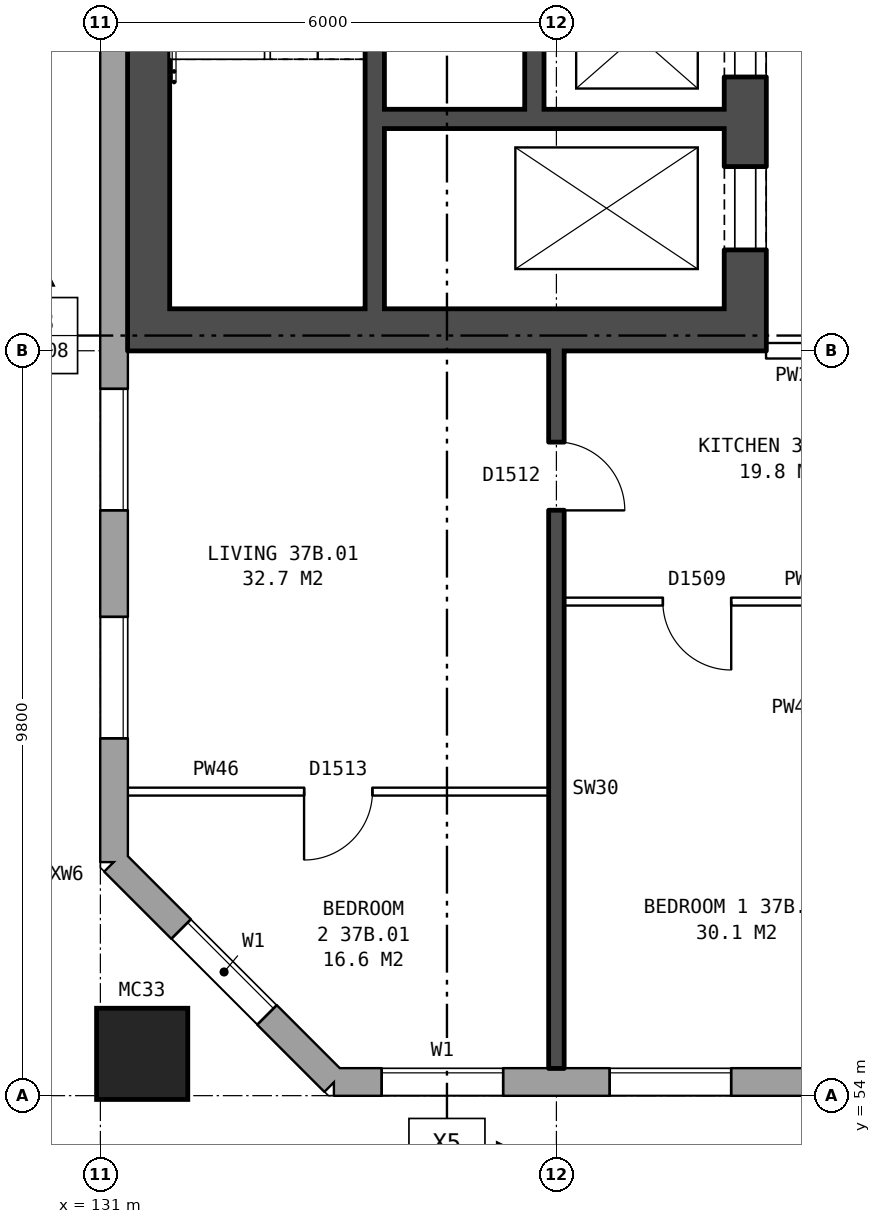
"""IFC4 building model, lengths in metres.
Left out: names, types, materials, properties, quantities, classifications, styles, units other than length and angle.
Written with IfcOpenShell. Run it as: python <this file> out.ifc"""

import sys

from ifc_helpers import new_model, si_unit, direction, frame, frame_2d, origin, origin_2d, place, context, subcontext, project, spatial, rectangle, hollow_rectangle, extrude, element, fill, save


model = new_model("IFC4")
c1 = context("Model", 3, precision=1e-05, world=origin(), true_north=direction((0.0, 1.0)))
c2 = subcontext(c1, "Body", "Model", "MODEL_VIEW")
j1 = project(units=[si_unit("LENGTHUNIT", "METRE"), si_unit("PLANEANGLEUNIT", "RADIAN")], contexts=[c1])
p1 = place(None, origin())
s1 = spatial("IfcSite", under=j1, at=p1, CompositionType="ELEMENT")
p2 = place(p1, origin())
s2 = spatial("IfcBuilding", under=s1, at=p2, CompositionType="ELEMENT")
p3 = place(p2, frame((0.0, 0.0, 133.0)))
s3 = spatial("IfcBuildingStorey", under=s2, at=p3, CompositionType="ELEMENT", Elevation=133.0)
p4 = place(p3, frame((131.55, 54.55, 0.0), z_axis=(0.0, 0.0, 1.0), x_axis=(1.0, 0.0, 0.0)))
e1 = element("IfcColumn", 1, at=p4, inside=s3, PredefinedType="COLUMN", context=c2, shape_type="SweptSolid", body=[
    extrude(hollow_rectangle(XDim=1.2, YDim=1.2, WallThickness=0.065, at=origin_2d()), origin(), (0.0, 0.0, 1.0), 3.1),
])
p5 = place(p3, frame((131.18, 57.075, 0.0), z_axis=(0.0, 0.0, 1.0), x_axis=(0.707106781187, -0.707106781187, 0.0)))
e2 = element("IfcWall", 2, at=p5, inside=s3, PredefinedType="STANDARD", context=c2, shape_type="SweptSolid", body=[
    extrude(rectangle(XDim=4.094, YDim=0.36, at=frame_2d((2.047, 0.0))), origin(), (0.0, 0.0, 1.0), 2.85),
])
p6 = place(p5, frame((1.247, 0.0, 0.8)))
e3 = element("IfcOpeningElement", 3, at=p6, cuts=e2, PredefinedType="OPENING", context=c2, shape_type="SweptSolid", body=[
    extrude(rectangle(XDim=1.6, YDim=1.8, at=frame_2d((0.8, 0.9))), frame((0.0, 0.19, 0.0), z_axis=(0.0, -1.0, 0.0), x_axis=(1.0, 0.0, 0.0)), (0.0, 0.0, 1.0), 0.38),
])
p7 = place(p3, frame((134.075, 54.18, 0.0), z_axis=(0.0, 0.0, 1.0), x_axis=(1.0, 0.0, 0.0)))
e4 = element("IfcWall", 4, at=p7, inside=s3, PredefinedType="STANDARD", context=c2, shape_type="SweptSolid", body=[
    extrude(rectangle(XDim=35.601, YDim=0.36, at=frame_2d((17.8, 0.0))), origin(), (0.0, 0.0, 1.0), 2.85),
])
p8 = place(p7, frame((0.625, 0.0, 0.8)))
e5 = element("IfcOpeningElement", 5, at=p8, cuts=e4, PredefinedType="OPENING", context=c2, shape_type="SweptSolid", body=[
    extrude(rectangle(XDim=1.6, YDim=1.8, at=frame_2d((0.8, 0.9))), frame((0.0, 0.19, 0.0), z_axis=(0.0, -1.0, 0.0), x_axis=(1.0, 0.0, 0.0)), (0.0, 0.0, 1.0), 0.38),
])
p9 = place(p7, frame((3.625, 0.0, 0.8)))
e6 = element("IfcOpeningElement", 6, at=p9, cuts=e4, PredefinedType="OPENING", context=c2, shape_type="SweptSolid", body=[
    extrude(rectangle(XDim=1.6, YDim=1.8, at=frame_2d((0.8, 0.9))), frame((0.0, 0.19, 0.0), z_axis=(0.0, -1.0, 0.0), x_axis=(1.0, 0.0, 0.0)), (0.0, 0.0, 1.0), 0.38),
])
p10 = place(p7, frame((6.625, 0.0, 0.8)))
e7 = element("IfcOpeningElement", 7, at=p10, cuts=e4, PredefinedType="OPENING", context=c2, shape_type="SweptSolid", body=[
    extrude(rectangle(XDim=1.6, YDim=1.8, at=frame_2d((0.8, 0.9))), frame((0.0, 0.19, 0.0), z_axis=(0.0, -1.0, 0.0), x_axis=(1.0, 0.0, 0.0)), (0.0, 0.0, 1.0), 0.38),
])
p11 = place(p7, frame((9.125, 0.0, 1.35)))
e8 = element("IfcOpeningElement", 8, at=p11, cuts=e4, PredefinedType="OPENING", context=c2, shape_type="SweptSolid", body=[
    extrude(rectangle(XDim=1.2, YDim=1.2, at=frame_2d((0.6, 0.6))), frame((0.0, 0.19, 0.0), z_axis=(0.0, -1.0, 0.0), x_axis=(1.0, 0.0, 0.0)), (0.0, 0.0, 1.0), 0.38),
])
p12 = place(p7, frame((12.625, 0.0, 0.8)))
e9 = element("IfcOpeningElement", 9, at=p12, cuts=e4, PredefinedType="OPENING", context=c2, shape_type="SweptSolid", body=[
    extrude(rectangle(XDim=1.6, YDim=1.8, at=frame_2d((0.8, 0.9))), frame((0.0, 0.19, 0.0), z_axis=(0.0, -1.0, 0.0), x_axis=(1.0, 0.0, 0.0)), (0.0, 0.0, 1.0), 0.38),
])
p13 = place(p7, frame((15.625, 0.0, 0.8)))
e10 = element("IfcOpeningElement", 10, at=p13, cuts=e4, PredefinedType="OPENING", context=c2, shape_type="SweptSolid", body=[
    extrude(rectangle(XDim=1.6, YDim=1.8, at=frame_2d((0.8, 0.9))), frame((0.0, 0.19, 0.0), z_axis=(0.0, -1.0, 0.0), x_axis=(1.0, 0.0, 0.0)), (0.0, 0.0, 1.0), 0.38),
])
p14 = place(p7, frame((18.625, 0.0, 0.8)))
e11 = element("IfcOpeningElement", 11, at=p14, cuts=e4, PredefinedType="OPENING", context=c2, shape_type="SweptSolid", body=[
    extrude(rectangle(XDim=1.6, YDim=1.8, at=frame_2d((0.8, 0.9))), frame((0.0, 0.19, 0.0), z_axis=(0.0, -1.0, 0.0), x_axis=(1.0, 0.0, 0.0)), (0.0, 0.0, 1.0), 0.38),
])
p15 = place(p7, frame((21.625, 0.0, 0.8)))
e12 = element("IfcOpeningElement", 12, at=p15, cuts=e4, PredefinedType="OPENING", context=c2, shape_type="SweptSolid", body=[
    extrude(rectangle(XDim=1.6, YDim=1.8, at=frame_2d((0.8, 0.9))), frame((0.0, 0.19, 0.0), z_axis=(0.0, -1.0, 0.0), x_axis=(1.0, 0.0, 0.0)), (0.0, 0.0, 1.0), 0.38),
])
p16 = place(p7, frame((24.975, 0.0, 1.7)))
e13 = element("IfcOpeningElement", 13, at=p16, cuts=e4, PredefinedType="OPENING", context=c2, shape_type="SweptSolid", body=[
    extrude(rectangle(XDim=0.6, YDim=0.9, at=frame_2d((0.3, 0.45))), frame((0.0, 0.19, 0.0), z_axis=(0.0, -1.0, 0.0), x_axis=(1.0, 0.0, 0.0)), (0.0, 0.0, 1.0), 0.38),
])
p17 = place(p7, frame((27.625, 0.0, 0.8)))
e14 = element("IfcOpeningElement", 14, at=p17, cuts=e4, PredefinedType="OPENING", context=c2, shape_type="SweptSolid", body=[
    extrude(rectangle(XDim=1.6, YDim=1.8, at=frame_2d((0.8, 0.9))), frame((0.0, 0.19, 0.0), z_axis=(0.0, -1.0, 0.0), x_axis=(1.0, 0.0, 0.0)), (0.0, 0.0, 1.0), 0.38),
])
p18 = place(p7, frame((30.625, 0.0, 0.8)))
e15 = element("IfcOpeningElement", 15, at=p18, cuts=e4, PredefinedType="OPENING", context=c2, shape_type="SweptSolid", body=[
    extrude(rectangle(XDim=1.6, YDim=1.8, at=frame_2d((0.8, 0.9))), frame((0.0, 0.19, 0.0), z_axis=(0.0, -1.0, 0.0), x_axis=(1.0, 0.0, 0.0)), (0.0, 0.0, 1.0), 0.38),
])
p19 = place(p7, frame((33.625, 0.0, 0.8)))
e16 = element("IfcOpeningElement", 16, at=p19, cuts=e4, PredefinedType="OPENING", context=c2, shape_type="SweptSolid", body=[
    extrude(rectangle(XDim=1.6, YDim=1.8, at=frame_2d((0.8, 0.9))), frame((0.0, 0.19, 0.0), z_axis=(0.0, -1.0, 0.0), x_axis=(1.0, 0.0, 0.0)), (0.0, 0.0, 1.0), 0.38),
])
p20 = place(p7, frame((11.125, 0.0, 0.15)))
e17 = element("IfcOpeningElement", 17, at=p20, cuts=e4, PredefinedType="OPENING", context=c2, shape_type="SweptSolid", body=[
    extrude(rectangle(XDim=0.6, YDim=0.9, at=frame_2d((0.3, 0.45))), frame((0.0, 0.19, 0.0), z_axis=(0.0, -1.0, 0.0), x_axis=(1.0, 0.0, 0.0)), (0.0, 0.0, 1.0), 0.38),
])
p21 = place(p7, frame((25.875, 0.0, 0.8)))
e18 = element("IfcOpeningElement", 18, at=p21, cuts=e4, PredefinedType="OPENING", context=c2, shape_type="SweptSolid", body=[
    extrude(rectangle(XDim=0.8, YDim=1.8, at=frame_2d((0.4, 0.9))), frame((0.0, 0.19, 0.0), z_axis=(0.0, -1.0, 0.0), x_axis=(1.0, 0.0, 0.0)), (0.0, 0.0, 1.0), 0.38),
])
p22 = place(p3, frame((131.18, 82.925, 0.0), z_axis=(0.0, 0.0, 1.0), x_axis=(0.0, -1.0, 0.0)))
e19 = element("IfcWall", 19, at=p22, inside=s3, PredefinedType="STANDARD", context=c2, shape_type="SweptSolid", body=[
    extrude(rectangle(XDim=25.851, YDim=0.36, at=frame_2d((12.925, 0.0))), origin(), (0.0, 0.0, 1.0), 2.85),
])
p23 = place(p22, frame((1.625, 0.0, 0.8)))
e20 = element("IfcOpeningElement", 20, at=p23, cuts=e19, PredefinedType="OPENING", context=c2, shape_type="SweptSolid", body=[
    extrude(rectangle(XDim=1.6, YDim=1.8, at=frame_2d((0.8, 0.9))), frame((0.0, 0.19, 0.0), z_axis=(0.0, -1.0, 0.0), x_axis=(1.0, 0.0, 0.0)), (0.0, 0.0, 1.0), 0.38),
])
p24 = place(p22, frame((4.625, 0.0, 0.8)))
e21 = element("IfcOpeningElement", 21, at=p24, cuts=e19, PredefinedType="OPENING", context=c2, shape_type="SweptSolid", body=[
    extrude(rectangle(XDim=1.6, YDim=1.8, at=frame_2d((0.8, 0.9))), frame((0.0, 0.19, 0.0), z_axis=(0.0, -1.0, 0.0), x_axis=(1.0, 0.0, 0.0)), (0.0, 0.0, 1.0), 0.38),
])
p25 = place(p22, frame((19.625, 0.0, 0.8)))
e22 = element("IfcOpeningElement", 22, at=p25, cuts=e19, PredefinedType="OPENING", context=c2, shape_type="SweptSolid", body=[
    extrude(rectangle(XDim=1.6, YDim=1.8, at=frame_2d((0.8, 0.9))), frame((0.0, 0.19, 0.0), z_axis=(0.0, -1.0, 0.0), x_axis=(1.0, 0.0, 0.0)), (0.0, 0.0, 1.0), 0.38),
])
p26 = place(p22, frame((22.625, 0.0, 0.8)))
e23 = element("IfcOpeningElement", 23, at=p26, cuts=e19, PredefinedType="OPENING", context=c2, shape_type="SweptSolid", body=[
    extrude(rectangle(XDim=1.6, YDim=1.8, at=frame_2d((0.8, 0.9))), frame((0.0, 0.19, 0.0), z_axis=(0.0, -1.0, 0.0), x_axis=(1.0, 0.0, 0.0)), (0.0, 0.0, 1.0), 0.38),
])
p27 = place(p3, frame((139.485, 63.8, 0.0), z_axis=(0.0, 0.0, 1.0), x_axis=(0.0, 1.0, 0.0)))
e24 = element("IfcWall", 24, at=p27, inside=s3, PredefinedType="SHEAR", context=c2, shape_type="SweptSolid", body=[
    extrude(rectangle(XDim=12.4, YDim=0.55, at=frame_2d((6.2, 0.0))), origin(), (0.0, 0.0, 1.0), 2.85),
])
p28 = place(p27, frame((1.325, 0.0, 0.0)))
e25 = element("IfcOpeningElement", 25, at=p28, cuts=e24, PredefinedType="OPENING", context=c2, shape_type="SweptSolid", body=[
    extrude(rectangle(XDim=1.1, YDim=2.1, at=frame_2d((0.55, 1.05))), frame((0.0, 0.285, 0.0), z_axis=(0.0, -1.0, 0.0), x_axis=(1.0, 0.0, 0.0)), (0.0, 0.0, 1.0), 0.57),
])
p29 = place(p27, frame((3.6, 0.0, 0.0)))
e26 = element("IfcOpeningElement", 26, at=p29, cuts=e24, PredefinedType="OPENING", context=c2, shape_type="SweptSolid", body=[
    extrude(rectangle(XDim=1.1, YDim=2.1, at=frame_2d((0.55, 1.05))), frame((0.0, 0.285, 0.0), z_axis=(0.0, -1.0, 0.0), x_axis=(1.0, 0.0, 0.0)), (0.0, 0.0, 1.0), 0.57),
])
p30 = place(p27, frame((5.8, 0.0, 0.0)))
e27 = element("IfcOpeningElement", 27, at=p30, cuts=e24, PredefinedType="OPENING", context=c2, shape_type="SweptSolid", body=[
    extrude(rectangle(XDim=1.1, YDim=2.1, at=frame_2d((0.55, 1.05))), frame((0.0, 0.285, 0.0), z_axis=(0.0, -1.0, 0.0), x_axis=(1.0, 0.0, 0.0)), (0.0, 0.0, 1.0), 0.57),
])
p31 = place(p27, frame((9.9, 0.0, 0.0)))
e28 = element("IfcOpeningElement", 28, at=p31, cuts=e24, PredefinedType="OPENING", context=c2, shape_type="SweptSolid", body=[
    extrude(rectangle(XDim=1.1, YDim=2.1, at=frame_2d((0.55, 1.05))), frame((0.0, 0.285, 0.0), z_axis=(0.0, -1.0, 0.0), x_axis=(1.0, 0.0, 0.0)), (0.0, 0.0, 1.0), 0.57),
])
p32 = place(p27, frame((8.125, 0.0, 0.0)))
e29 = element("IfcOpeningElement", 29, at=p32, cuts=e24, PredefinedType="OPENING", context=c2, shape_type="SweptSolid", body=[
    extrude(rectangle(XDim=0.85, YDim=2.1, at=frame_2d((0.425, 1.05))), frame((0.0, 0.285, 0.0), z_axis=(0.0, -1.0, 0.0), x_axis=(1.0, 0.0, 0.0)), (0.0, 0.0, 1.0), 0.57),
])
p33 = place(p3, frame((131.635, 63.8, 0.0), z_axis=(0.0, 0.0, 1.0), x_axis=(0.0, 1.0, 0.0)))
e30 = element("IfcWall", 30, at=p33, inside=s3, PredefinedType="SHEAR", context=c2, shape_type="SweptSolid", body=[
    extrude(rectangle(XDim=12.4, YDim=0.55, at=frame_2d((6.2, 0.0))), origin(), (0.0, 0.0, 1.0), 2.85),
])
p34 = place(p3, frame((139.21, 64.075, 0.0), z_axis=(0.0, 0.0, 1.0), x_axis=(-1.0, 0.0, 0.0)))
e31 = element("IfcWall", 31, at=p34, inside=s3, PredefinedType="SHEAR", context=c2, shape_type="SweptSolid", body=[
    extrude(rectangle(XDim=7.3, YDim=0.55, at=frame_2d((3.65, 0.0))), origin(), (0.0, 0.0, 1.0), 2.85),
])
p35 = place(p3, frame((139.21, 66.85, 0.0), z_axis=(0.0, 0.0, 1.0), x_axis=(-1.0, 0.0, 0.0)))
e32 = element("IfcWall", 32, at=p35, inside=s3, PredefinedType="SHEAR", context=c2, shape_type="SweptSolid", body=[
    extrude(rectangle(XDim=4.475, YDim=0.25, at=frame_2d((2.237, 0.0))), origin(), (0.0, 0.0, 1.0), 2.85),
])
p36 = place(p3, frame((136.71, 66.975, 0.0), z_axis=(0.0, 0.0, 1.0), x_axis=(0.0, 1.0, 0.0)))
e33 = element("IfcWall", 33, at=p36, inside=s3, PredefinedType="SHEAR", context=c2, shape_type="SweptSolid", body=[
    extrude(rectangle(XDim=4.15, YDim=0.25, at=frame_2d((2.075, 0.0))), origin(), (0.0, 0.0, 1.0), 2.85),
])
p37 = place(p3, frame((134.61, 64.35, 0.0), z_axis=(0.0, 0.0, 1.0), x_axis=(0.0, 1.0, 0.0)))
e34 = element("IfcWall", 34, at=p37, inside=s3, PredefinedType="SHEAR", context=c2, shape_type="SweptSolid", body=[
    extrude(rectangle(XDim=6.775, YDim=0.25, at=frame_2d((3.387, 0.0))), origin(), (0.0, 0.0, 1.0), 2.85),
])
p38 = place(p3, frame((131.36, 58.0, 0.0), z_axis=(0.0, 0.0, 1.0), x_axis=(1.0, 0.0, 0.0)))
e35 = element("IfcWall", 35, at=p38, inside=s3, PredefinedType="PARTITIONING", context=c2, shape_type="SweptSolid", body=[
    extrude(rectangle(XDim=5.54, YDim=0.1, at=frame_2d((2.77, 0.0))), origin(), (0.0, 0.0, 1.0), 2.85),
])
p39 = place(p38, frame((2.32, 0.0, 0.0)))
e36 = element("IfcOpeningElement", 36, at=p39, cuts=e35, PredefinedType="OPENING", context=c2, shape_type="SweptSolid", body=[
    extrude(rectangle(XDim=0.9, YDim=2.1, at=frame_2d((0.45, 1.05))), frame((0.0, 0.06, 0.0), z_axis=(0.0, -1.0, 0.0), x_axis=(1.0, 0.0, 0.0)), (0.0, 0.0, 1.0), 0.12),
])
p40 = place(p3, frame((137.1, 60.5, 0.0), z_axis=(0.0, 0.0, 1.0), x_axis=(1.0, 0.0, 0.0)))
e37 = element("IfcWall", 37, at=p40, inside=s3, PredefinedType="PARTITIONING", context=c2, shape_type="SweptSolid", body=[
    extrude(rectangle(XDim=5.8, YDim=0.1, at=frame_2d((2.9, 0.0))), origin(), (0.0, 0.0, 1.0), 2.85),
])
p41 = place(p40, frame((1.3, 0.0, 0.0)))
e38 = element("IfcOpeningElement", 38, at=p41, cuts=e37, PredefinedType="OPENING", context=c2, shape_type="SweptSolid", body=[
    extrude(rectangle(XDim=0.9, YDim=2.1, at=frame_2d((0.45, 1.05))), frame((0.0, 0.06, 0.0), z_axis=(0.0, -1.0, 0.0), x_axis=(1.0, 0.0, 0.0)), (0.0, 0.0, 1.0), 0.12),
])
p42 = place(p40, frame((4.2, 0.0, 0.0)))
e39 = element("IfcOpeningElement", 39, at=p42, cuts=e37, PredefinedType="OPENING", context=c2, shape_type="SweptSolid", body=[
    extrude(rectangle(XDim=0.9, YDim=2.1, at=frame_2d((0.45, 1.05))), frame((0.0, 0.06, 0.0), z_axis=(0.0, -1.0, 0.0), x_axis=(1.0, 0.0, 0.0)), (0.0, 0.0, 1.0), 0.12),
])
p43 = place(p3, frame((139.76, 63.8, 0.0), z_axis=(0.0, 0.0, 1.0), x_axis=(1.0, 0.0, 0.0)))
e40 = element("IfcWall", 40, at=p43, inside=s3, PredefinedType="PARTITIONING", context=c2, shape_type="SweptSolid", body=[
    extrude(rectangle(XDim=3.0, YDim=0.2, at=frame_2d((1.5, 0.0))), origin(), (0.0, 0.0, 1.0), 2.85),
])
p44 = place(p43, frame((1.0, 0.0, 0.0)))
e41 = element("IfcOpeningElement", 41, at=p44, cuts=e40, PredefinedType="OPENING", context=c2, shape_type="SweptSolid", body=[
    extrude(rectangle(XDim=1.0, YDim=2.1, at=frame_2d((0.5, 1.05))), frame((0.0, 0.11, 0.0), z_axis=(0.0, -1.0, 0.0), x_axis=(1.0, 0.0, 0.0)), (0.0, 0.0, 1.0), 0.22),
])
p45 = place(p3, frame((137.0, 54.36, 0.0), z_axis=(0.0, 0.0, 1.0), x_axis=(0.0, 1.0, 0.0)))
e42 = element("IfcWall", 42, at=p45, inside=s3, PredefinedType="SOLIDWALL", context=c2, shape_type="SweptSolid", body=[
    extrude(rectangle(XDim=9.44, YDim=0.2, at=frame_2d((4.72, 0.0))), origin(), (0.0, 0.0, 1.0), 2.85),
])
p46 = place(p45, frame((7.34, 0.0, 0.0)))
e43 = element("IfcOpeningElement", 43, at=p46, cuts=e42, PredefinedType="OPENING", context=c2, shape_type="SweptSolid", body=[
    extrude(rectangle(XDim=0.9, YDim=2.1, at=frame_2d((0.45, 1.05))), frame((0.0, 0.11, 0.0), z_axis=(0.0, -1.0, 0.0), x_axis=(1.0, 0.0, 0.0)), (0.0, 0.0, 1.0), 0.22),
])
p47 = place(p6, origin())
e44 = element("IfcWindow", 44, at=p47, inside=s3, PartitioningType="SINGLE_PANEL", PredefinedType="WINDOW", context=c2, shape_type="SweptSolid", body=[
    extrude(rectangle(XDim=1.6, YDim=1.8, at=frame_2d((0.8, 0.9))), frame((0.0, 0.15, 0.0), z_axis=(0.0, -1.0, 0.0), x_axis=(1.0, 0.0, 0.0)), (0.0, 0.0, 1.0), 0.06),
])
fill(e3, e44)
p48 = place(p8, origin())
e45 = element("IfcWindow", 45, at=p48, inside=s3, PartitioningType="SINGLE_PANEL", PredefinedType="WINDOW", context=c2, shape_type="SweptSolid", body=[
    extrude(rectangle(XDim=1.6, YDim=1.8, at=frame_2d((0.8, 0.9))), frame((0.0, 0.15, 0.0), z_axis=(0.0, -1.0, 0.0), x_axis=(1.0, 0.0, 0.0)), (0.0, 0.0, 1.0), 0.06),
])
fill(e5, e45)
p49 = place(p9, origin())
e46 = element("IfcWindow", 46, at=p49, inside=s3, PartitioningType="SINGLE_PANEL", PredefinedType="WINDOW", context=c2, shape_type="SweptSolid", body=[
    extrude(rectangle(XDim=1.6, YDim=1.8, at=frame_2d((0.8, 0.9))), frame((0.0, 0.15, 0.0), z_axis=(0.0, -1.0, 0.0), x_axis=(1.0, 0.0, 0.0)), (0.0, 0.0, 1.0), 0.06),
])
fill(e6, e46)
p50 = place(p25, origin())
e47 = element("IfcWindow", 47, at=p50, inside=s3, PartitioningType="SINGLE_PANEL", PredefinedType="WINDOW", context=c2, shape_type="SweptSolid", body=[
    extrude(rectangle(XDim=1.6, YDim=1.8, at=frame_2d((0.8, 0.9))), frame((0.0, 0.15, 0.0), z_axis=(0.0, -1.0, 0.0), x_axis=(1.0, 0.0, 0.0)), (0.0, 0.0, 1.0), 0.06),
])
fill(e22, e47)
p51 = place(p26, origin())
e48 = element("IfcWindow", 48, at=p51, inside=s3, PartitioningType="SINGLE_PANEL", PredefinedType="WINDOW", context=c2, shape_type="SweptSolid", body=[
    extrude(rectangle(XDim=1.6, YDim=1.8, at=frame_2d((0.8, 0.9))), frame((0.0, 0.15, 0.0), z_axis=(0.0, -1.0, 0.0), x_axis=(1.0, 0.0, 0.0)), (0.0, 0.0, 1.0), 0.06),
])
fill(e23, e48)
p52 = place(p28, origin())
e49 = element("IfcDoor", 49, at=p52, inside=s3, OperationType="DOUBLE_DOOR_SLIDING", PredefinedType="DOOR", context=c2, shape_type="SweptSolid", body=[
    extrude(rectangle(XDim=1.1, YDim=2.1, at=frame_2d((0.55, 1.05))), frame((0.0, 0.26, 0.0), z_axis=(0.0, -1.0, 0.0), x_axis=(1.0, 0.0, 0.0)), (0.0, 0.0, 1.0), 0.05),
])
fill(e25, e49)
p53 = place(p29, origin())
e50 = element("IfcDoor", 50, at=p53, inside=s3, OperationType="DOUBLE_DOOR_SLIDING", PredefinedType="DOOR", context=c2, shape_type="SweptSolid", body=[
    extrude(rectangle(XDim=1.1, YDim=2.1, at=frame_2d((0.55, 1.05))), frame((0.0, 0.26, 0.0), z_axis=(0.0, -1.0, 0.0), x_axis=(1.0, 0.0, 0.0)), (0.0, 0.0, 1.0), 0.05),
])
fill(e26, e50)
p54 = place(p41, frame((0.9, 0.0, 0.0), z_axis=(0.0, 0.0, 1.0), x_axis=(-1.0, 0.0, 0.0)))
e51 = element("IfcDoor", 51, at=p54, inside=s3, OperationType="SINGLE_SWING_LEFT", PredefinedType="DOOR", context=c2, shape_type="SweptSolid", body=[
    extrude(rectangle(XDim=0.9, YDim=2.1, at=frame_2d((0.45, 1.05))), frame((0.0, 0.025, 0.0), z_axis=(0.0, -1.0, 0.0), x_axis=(1.0, 0.0, 0.0)), (0.0, 0.0, 1.0), 0.05),
])
fill(e38, e51)
p55 = place(p39, frame((0.9, 0.0, 0.0), z_axis=(0.0, 0.0, 1.0), x_axis=(-1.0, 0.0, 0.0)))
e52 = element("IfcDoor", 52, at=p55, inside=s3, OperationType="SINGLE_SWING_RIGHT", PredefinedType="DOOR", context=c2, shape_type="SweptSolid", body=[
    extrude(rectangle(XDim=0.9, YDim=2.1, at=frame_2d((0.45, 1.05))), frame((0.0, 0.025, 0.0), z_axis=(0.0, -1.0, 0.0), x_axis=(1.0, 0.0, 0.0)), (0.0, 0.0, 1.0), 0.05),
])
fill(e36, e52)
p56 = place(p46, frame((0.9, 0.0, 0.0), z_axis=(0.0, 0.0, 1.0), x_axis=(-1.0, 0.0, 0.0)))
e53 = element("IfcDoor", 53, at=p56, inside=s3, OperationType="SINGLE_SWING_RIGHT", PredefinedType="DOOR", context=c2, shape_type="SweptSolid", body=[
    extrude(rectangle(XDim=0.9, YDim=2.1, at=frame_2d((0.45, 1.05))), frame((0.0, 0.025, 0.0), z_axis=(0.0, -1.0, 0.0), x_axis=(1.0, 0.0, 0.0)), (0.0, 0.0, 1.0), 0.05),
])
fill(e43, e53)
save(model, sys.argv[1])
